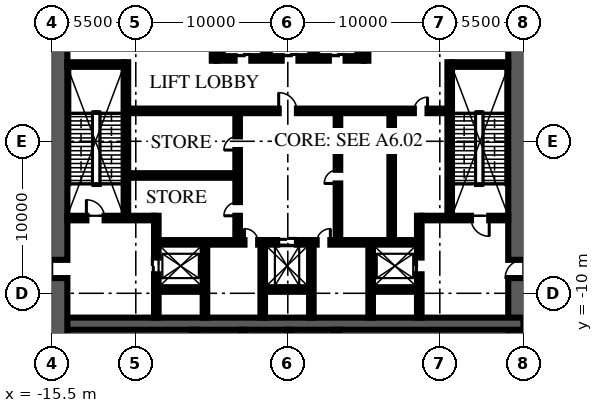
"""IFC4 building model, lengths in metres.
Left out: names, types, materials, properties, quantities, classifications, styles, units other than length and angle.
Written with IfcOpenShell. Run it as: python <this file> out.ifc"""

import sys

from ifc_helpers import new_model, si_unit, direction, frame, frame_2d, origin, place, context, subcontext, project, spatial, rectangle, extrude, element, fill, save


model = new_model("IFC4")
c1 = context("Model", 3, precision=1e-05, world=origin(), true_north=direction((0.0, 1.0)))
c2 = subcontext(c1, "Body", "Model", "MODEL_VIEW")
j1 = project(units=[si_unit("LENGTHUNIT", "METRE"), si_unit("PLANEANGLEUNIT", "RADIAN")], contexts=[c1])
p1 = place(None, origin())
s1 = spatial("IfcSite", under=j1, at=p1, CompositionType="ELEMENT")
p2 = place(p1, origin())
s2 = spatial("IfcBuilding", under=s1, at=p2, CompositionType="ELEMENT")
p3 = place(p2, origin())
s3 = spatial("IfcBuildingStorey", under=s2, at=p3, CompositionType="ELEMENT", Elevation=0.0)
p4 = place(p3, frame((15.5, -15.5, -0.3), z_axis=(0.0, 0.0, 1.0), x_axis=(0.0, 1.0, 0.0)))
e1 = element("IfcWall", 1, at=p4, inside=s3, PredefinedType="SHEAR", context=c2, shape_type="SweptSolid", body=[
    extrude(rectangle(XDim=31.0, YDim=2.0, at=frame_2d((15.5, 0.0))), origin(), (0.0, 0.0, 1.0), 6.0),
])
p5 = place(p4, frame((6.5, 0.0, 0.3)))
e2 = element("IfcOpeningElement", 2, at=p5, cuts=e1, PredefinedType="OPENING", context=c2, shape_type="SweptSolid", body=[
    extrude(rectangle(XDim=1.2, YDim=2.1, at=frame_2d((0.6, 1.05))), frame((0.0, 1.01, 0.0), z_axis=(0.0, -1.0, 0.0), x_axis=(1.0, 0.0, 0.0)), (0.0, 0.0, 1.0), 2.02),
])
p6 = place(p4, frame((23.0, 0.0, 0.3)))
e3 = element("IfcOpeningElement", 3, at=p6, cuts=e1, PredefinedType="OPENING", context=c2, shape_type="SweptSolid", body=[
    extrude(rectangle(XDim=1.8, YDim=2.1, at=frame_2d((0.9, 1.05))), frame((0.0, 1.01, 0.0), z_axis=(0.0, -1.0, 0.0), x_axis=(1.0, 0.0, 0.0)), (0.0, 0.0, 1.0), 2.02),
])
p7 = place(p3, frame((-15.5, -12.0, -0.3), z_axis=(0.0, 0.0, 1.0), x_axis=(1.0, 0.0, 0.0)))
e4 = element("IfcWall", 4, at=p7, inside=s3, PredefinedType="SHEAR", context=c2, shape_type="SweptSolid", body=[
    extrude(rectangle(XDim=31.0, YDim=0.8, at=frame_2d((15.5, 0.0))), origin(), (0.0, 0.0, 1.0), 6.0),
])
p8 = place(p3, frame((-15.5, -15.5, -0.3), z_axis=(0.0, 0.0, 1.0), x_axis=(0.0, 1.0, 0.0)))
e5 = element("IfcWall", 5, at=p8, inside=s3, PredefinedType="SHEAR", context=c2, shape_type="SweptSolid", body=[
    extrude(rectangle(XDim=31.0, YDim=2.0, at=frame_2d((15.5, 0.0))), origin(), (0.0, 0.0, 1.0), 6.0),
])
p9 = place(p8, frame((6.5, 0.0, 0.3)))
e6 = element("IfcOpeningElement", 6, at=p9, cuts=e5, PredefinedType="OPENING", context=c2, shape_type="SweptSolid", body=[
    extrude(rectangle(XDim=1.2, YDim=2.1, at=frame_2d((0.6, 1.05))), frame((0.0, 1.01, 0.0), z_axis=(0.0, -1.0, 0.0), x_axis=(1.0, 0.0, 0.0)), (0.0, 0.0, 1.0), 2.02),
])
p10 = place(p8, frame((23.0, 0.0, 0.3)))
e7 = element("IfcOpeningElement", 7, at=p10, cuts=e5, PredefinedType="OPENING", context=c2, shape_type="SweptSolid", body=[
    extrude(rectangle(XDim=1.8, YDim=2.1, at=frame_2d((0.9, 1.05))), frame((0.0, 1.01, 0.0), z_axis=(0.0, -1.0, 0.0), x_axis=(1.0, 0.0, 0.0)), (0.0, 0.0, 1.0), 2.02),
])
p11 = place(p3, frame((-10.65, -4.9, 0.0), z_axis=(0.0, 0.0, 1.0), x_axis=(0.0, 1.0, 0.0)))
e8 = element("IfcWall", 8, at=p11, inside=s3, PredefinedType="SOLIDWALL", context=c2, shape_type="SweptSolid", body=[
    extrude(rectangle(XDim=10.1, YDim=0.3, at=frame_2d((5.05, 0.0))), origin(), (0.0, 0.0, 1.0), 5.7),
])
p12 = place(p3, frame((-14.5, -5.05, 0.0), z_axis=(0.0, 0.0, 1.0), x_axis=(1.0, 0.0, 0.0)))
e9 = element("IfcWall", 9, at=p12, inside=s3, PredefinedType="SOLIDWALL", context=c2, shape_type="SweptSolid", body=[
    extrude(rectangle(XDim=5.7, YDim=0.3, at=frame_2d((2.85, 0.0))), origin(), (0.0, 0.0, 1.0), 5.7),
])
p13 = place(p12, frame((1.25, 0.0, 0.0)))
e10 = element("IfcOpeningElement", 10, at=p13, cuts=e9, PredefinedType="OPENING", context=c2, shape_type="SweptSolid", body=[
    extrude(rectangle(XDim=1.2, YDim=2.1, at=frame_2d((0.6, 1.05))), frame((0.0, 0.16, 0.0), z_axis=(0.0, -1.0, 0.0), x_axis=(1.0, 0.0, 0.0)), (0.0, 0.0, 1.0), 0.32),
])
p14 = place(p3, frame((-14.5, 5.05, 0.0), z_axis=(0.0, 0.0, 1.0), x_axis=(1.0, 0.0, 0.0)))
e11 = element("IfcWall", 11, at=p14, inside=s3, PredefinedType="SOLIDWALL", context=c2, shape_type="SweptSolid", body=[
    extrude(rectangle(XDim=3.7, YDim=0.3, at=frame_2d((1.85, 0.0))), origin(), (0.0, 0.0, 1.0), 5.7),
])
p15 = place(p3, frame((-8.65, -11.6, 0.0), z_axis=(0.0, 0.0, 1.0), x_axis=(0.0, 1.0, 0.0)))
e12 = element("IfcWall", 12, at=p15, inside=s3, PredefinedType="PARTITIONING", context=c2, shape_type="SweptSolid", body=[
    extrude(rectangle(XDim=6.7, YDim=0.3, at=frame_2d((3.35, 0.0))), origin(), (0.0, 0.0, 1.0), 5.7),
])
p16 = place(p15, frame((2.85, 0.0, 0.0)))
e13 = element("IfcOpeningElement", 13, at=p16, cuts=e12, PredefinedType="OPENING", context=c2, shape_type="SweptSolid", body=[
    extrude(rectangle(XDim=1.1, YDim=2.1, at=frame_2d((0.55, 1.05))), frame((0.0, 0.16, 0.0), z_axis=(0.0, -1.0, 0.0), x_axis=(1.0, 0.0, 0.0)), (0.0, 0.0, 1.0), 0.32),
])
p17 = place(p3, frame((10.65, -4.9, 0.0), z_axis=(0.0, 0.0, 1.0), x_axis=(0.0, 1.0, 0.0)))
e14 = element("IfcWall", 14, at=p17, inside=s3, PredefinedType="SOLIDWALL", context=c2, shape_type="SweptSolid", body=[
    extrude(rectangle(XDim=10.1, YDim=0.3, at=frame_2d((5.05, 0.0))), origin(), (0.0, 0.0, 1.0), 5.7),
])
p18 = place(p3, frame((14.5, -5.05, 0.0), z_axis=(0.0, 0.0, 1.0), x_axis=(-1.0, 0.0, 0.0)))
e15 = element("IfcWall", 15, at=p18, inside=s3, PredefinedType="SOLIDWALL", context=c2, shape_type="SweptSolid", body=[
    extrude(rectangle(XDim=5.7, YDim=0.3, at=frame_2d((2.85, 0.0))), origin(), (0.0, 0.0, 1.0), 5.7),
])
p19 = place(p18, frame((1.25, 0.0, 0.0)))
e16 = element("IfcOpeningElement", 16, at=p19, cuts=e15, PredefinedType="OPENING", context=c2, shape_type="SweptSolid", body=[
    extrude(rectangle(XDim=1.2, YDim=2.1, at=frame_2d((0.6, 1.05))), frame((0.0, 0.16, 0.0), z_axis=(0.0, -1.0, 0.0), x_axis=(1.0, 0.0, 0.0)), (0.0, 0.0, 1.0), 0.32),
])
p20 = place(p3, frame((14.5, 5.05, 0.0), z_axis=(0.0, 0.0, 1.0), x_axis=(-1.0, 0.0, 0.0)))
e17 = element("IfcWall", 17, at=p20, inside=s3, PredefinedType="SOLIDWALL", context=c2, shape_type="SweptSolid", body=[
    extrude(rectangle(XDim=3.7, YDim=0.3, at=frame_2d((1.85, 0.0))), origin(), (0.0, 0.0, 1.0), 5.7),
])
p21 = place(p3, frame((8.65, -11.6, 0.0), z_axis=(0.0, 0.0, 1.0), x_axis=(0.0, 1.0, 0.0)))
e18 = element("IfcWall", 18, at=p21, inside=s3, PredefinedType="PARTITIONING", context=c2, shape_type="SweptSolid", body=[
    extrude(rectangle(XDim=6.7, YDim=0.3, at=frame_2d((3.35, 0.0))), origin(), (0.0, 0.0, 1.0), 5.7),
])
p22 = place(p21, frame((2.85, 0.0, 0.0)))
e19 = element("IfcOpeningElement", 19, at=p22, cuts=e18, PredefinedType="OPENING", context=c2, shape_type="SweptSolid", body=[
    extrude(rectangle(XDim=1.1, YDim=2.1, at=frame_2d((0.55, 1.05))), frame((0.0, 0.16, 0.0), z_axis=(0.0, -1.0, 0.0), x_axis=(1.0, 0.0, 0.0)), (0.0, 0.0, 1.0), 0.32),
])
p23 = place(p3, frame((-8.5, -6.65, 0.0), z_axis=(0.0, 0.0, 1.0), x_axis=(1.0, 0.0, 0.0)))
e20 = element("IfcWall", 20, at=p23, inside=s3, PredefinedType="PARTITIONING", context=c2, shape_type="SweptSolid", body=[
    extrude(rectangle(XDim=17.0, YDim=0.3, at=frame_2d((8.5, 0.0))), origin(), (0.0, 0.0, 1.0), 5.7),
])
p24 = place(p23, frame((7.8, 0.0, 0.0)))
e21 = element("IfcOpeningElement", 21, at=p24, cuts=e20, PredefinedType="OPENING", context=c2, shape_type="SweptSolid", body=[
    extrude(rectangle(XDim=1.3, YDim=2.4, at=frame_2d((0.65, 1.2))), frame((0.0, 0.16, 0.0), z_axis=(0.0, -1.0, 0.0), x_axis=(1.0, 0.0, 0.0)), (0.0, 0.0, 1.0), 0.32),
])
p25 = place(p23, frame((5.65, 0.0, 0.0)))
e22 = element("IfcOpeningElement", 22, at=p25, cuts=e20, PredefinedType="OPENING", context=c2, shape_type="SweptSolid", body=[
    extrude(rectangle(XDim=0.9, YDim=2.1, at=frame_2d((0.45, 1.05))), frame((0.0, 0.16, 0.0), z_axis=(0.0, -1.0, 0.0), x_axis=(1.0, 0.0, 0.0)), (0.0, 0.0, 1.0), 0.32),
])
p26 = place(p23, frame((10.4, 0.0, 0.0)))
e23 = element("IfcOpeningElement", 23, at=p26, cuts=e20, PredefinedType="OPENING", context=c2, shape_type="SweptSolid", body=[
    extrude(rectangle(XDim=0.9, YDim=2.1, at=frame_2d((0.45, 1.05))), frame((0.0, 0.16, 0.0), z_axis=(0.0, -1.0, 0.0), x_axis=(1.0, 0.0, 0.0)), (0.0, 0.0, 1.0), 0.32),
])
for number, where, z_axis, x_axis in (
    (24, (-5.45, -11.6, 0.0), (0.0, 0.0, 1.0), (0.0, 1.0, 0.0)),
    (25, (-1.65, -11.6, 0.0), (0.0, 0.0, 1.0), (0.0, 1.0, 0.0)),
    (26, (1.55, -11.6, 0.0), (0.0, 0.0, 1.0), (0.0, 1.0, 0.0)),
    (27, (5.45, -11.6, 0.0), (0.0, 0.0, 1.0), (0.0, 1.0, 0.0)),
):
    element("IfcWall", number, at=place(p3, frame(where, z_axis=z_axis, x_axis=x_axis)), inside=s3, PredefinedType="PARTITIONING", context=c2, shape_type="SweptSolid", body=[
        extrude(rectangle(XDim=4.8, YDim=0.3, at=frame_2d((2.4, 0.0))), origin(), (0.0, 0.0, 1.0), 5.7),
    ])
for number, where, z_axis, x_axis in (
    (28, (-8.5, -9.75, 0.0), (0.0, 0.0, 1.0), (1.0, 0.0, 0.0)),
    (29, (-1.5, -9.75, 0.0), (0.0, 0.0, 1.0), (1.0, 0.0, 0.0)),
    (30, (5.6, -9.75, 0.0), (0.0, 0.0, 1.0), (1.0, 0.0, 0.0)),
):
    element("IfcWall", number, at=place(p3, frame(where, z_axis=z_axis, x_axis=x_axis)), inside=s3, PredefinedType="PARTITIONING", context=c2, shape_type="SweptSolid", body=[
        extrude(rectangle(XDim=2.9, YDim=0.3, at=frame_2d((1.45, 0.0))), origin(), (0.0, 0.0, 1.0), 5.7),
    ])
p27 = place(p3, frame((-4.7, 5.45, 0.0), z_axis=(0.0, 0.0, 1.0), x_axis=(1.0, 0.0, 0.0)))
e31 = element("IfcWall", 31, at=p27, inside=s3, PredefinedType="PARTITIONING", context=c2, shape_type="SweptSolid", body=[
    extrude(rectangle(XDim=9.7, YDim=0.3, at=frame_2d((4.85, 0.0))), origin(), (0.0, 0.0, 1.0), 5.7),
])
p28 = place(p27, frame((1.2, 0.0, 0.0)))
e32 = element("IfcOpeningElement", 32, at=p28, cuts=e31, PredefinedType="OPENING", context=c2, shape_type="SweptSolid", body=[
    extrude(rectangle(XDim=1.1, YDim=2.1, at=frame_2d((0.55, 1.05))), frame((0.0, 0.16, 0.0), z_axis=(0.0, -1.0, 0.0), x_axis=(1.0, 0.0, 0.0)), (0.0, 0.0, 1.0), 0.32),
])
p29 = place(p27, frame((4.3, 0.0, 0.0)))
e33 = element("IfcOpeningElement", 33, at=p29, cuts=e31, PredefinedType="OPENING", context=c2, shape_type="SweptSolid", body=[
    extrude(rectangle(XDim=1.1, YDim=2.1, at=frame_2d((0.55, 1.05))), frame((0.0, 0.16, 0.0), z_axis=(0.0, -1.0, 0.0), x_axis=(1.0, 0.0, 0.0)), (0.0, 0.0, 1.0), 0.32),
])
p30 = place(p27, frame((7.4, 0.0, 0.0)))
e34 = element("IfcOpeningElement", 34, at=p30, cuts=e31, PredefinedType="OPENING", context=c2, shape_type="SweptSolid", body=[
    extrude(rectangle(XDim=1.1, YDim=2.1, at=frame_2d((0.55, 1.05))), frame((0.0, 0.16, 0.0), z_axis=(0.0, -1.0, 0.0), x_axis=(1.0, 0.0, 0.0)), (0.0, 0.0, 1.0), 0.32),
])
for number, where, z_axis, x_axis in (
    (35, (-4.55, 5.6, 0.0), (0.0, 0.0, 1.0), (0.0, 1.0, 0.0)),
    (36, (4.85, 5.6, 0.0), (0.0, 0.0, 1.0), (0.0, 1.0, 0.0)),
):
    element("IfcWall", number, at=place(p3, frame(where, z_axis=z_axis, x_axis=x_axis)), inside=s3, PredefinedType="PARTITIONING", context=c2, shape_type="SweptSolid", body=[
        extrude(rectangle(XDim=2.8, YDim=0.3, at=frame_2d((1.4, 0.0))), origin(), (0.0, 0.0, 1.0), 5.7),
    ])
for number, where, z_axis, x_axis in (
    (37, (-1.4, 5.6, 0.0), (0.0, 0.0, 1.0), (0.0, 1.0, 0.0)),
    (38, (1.7, 5.6, 0.0), (0.0, 0.0, 1.0), (0.0, 1.0, 0.0)),
):
    element("IfcWall", number, at=place(p3, frame(where, z_axis=z_axis, x_axis=x_axis)), inside=s3, PredefinedType="PARTITIONING", context=c2, shape_type="SweptSolid", body=[
        extrude(rectangle(XDim=2.8, YDim=0.2, at=frame_2d((1.4, 0.0))), origin(), (0.0, 0.0, 1.0), 5.7),
    ])
for number, where, z_axis, x_axis in (
    (39, (-6.15, -14.5, 0.0), (0.0, 0.0, 1.0), (0.0, 1.0, 0.0)),
    (40, (3.25, -14.5, 0.0), (0.0, 0.0, 1.0), (0.0, 1.0, 0.0)),
):
    element("IfcWall", number, at=place(p3, frame(where, z_axis=z_axis, x_axis=x_axis)), inside=s3, PredefinedType="PARTITIONING", context=c2, shape_type="SweptSolid", body=[
        extrude(rectangle(XDim=2.1, YDim=0.3, at=frame_2d((1.05, 0.0))), origin(), (0.0, 0.0, 1.0), 5.7),
    ])
for number, where, z_axis, x_axis in (
    (41, (-3.0, -14.5, 0.0), (0.0, 0.0, 1.0), (0.0, 1.0, 0.0)),
    (42, (0.1, -14.5, 0.0), (0.0, 0.0, 1.0), (0.0, 1.0, 0.0)),
):
    element("IfcWall", number, at=place(p3, frame(where, z_axis=z_axis, x_axis=x_axis)), inside=s3, PredefinedType="PARTITIONING", context=c2, shape_type="SweptSolid", body=[
        extrude(rectangle(XDim=2.1, YDim=0.2, at=frame_2d((1.05, 0.0))), origin(), (0.0, 0.0, 1.0), 5.7),
    ])
p31 = place(p3, frame((-10.65, 2.0, 0.0), z_axis=(0.0, 0.0, 1.0), x_axis=(1.0, 0.0, 0.0)))
e43 = element("IfcWall", 43, at=p31, inside=s3, PredefinedType="PARTITIONING", context=c2, shape_type="SweptSolid", body=[
    extrude(rectangle(XDim=21.3, YDim=0.3, at=frame_2d((10.65, 0.0))), origin(), (0.0, 0.0, 1.0), 5.7),
])
p32 = place(p31, frame((10.05, 0.0, 0.0)))
e44 = element("IfcOpeningElement", 44, at=p32, cuts=e43, PredefinedType="OPENING", context=c2, shape_type="SweptSolid", body=[
    extrude(rectangle(XDim=1.2, YDim=2.1, at=frame_2d((0.6, 1.05))), frame((0.0, 0.16, 0.0), z_axis=(0.0, -1.0, 0.0), x_axis=(1.0, 0.0, 0.0)), (0.0, 0.0, 1.0), 0.32),
])
p33 = place(p31, frame((18.942, 0.0, 0.0)))
e45 = element("IfcOpeningElement", 45, at=p33, cuts=e43, PredefinedType="OPENING", context=c2, shape_type="SweptSolid", body=[
    extrude(rectangle(XDim=0.9, YDim=2.1, at=frame_2d((0.45, 1.05))), frame((0.0, 0.16, 0.0), z_axis=(0.0, -1.0, 0.0), x_axis=(1.0, 0.0, 0.0)), (0.0, 0.0, 1.0), 0.32),
])
p34 = place(p3, frame((-3.3, -6.65, 0.0), z_axis=(0.0, 0.0, 1.0), x_axis=(0.0, 1.0, 0.0)))
e46 = element("IfcWall", 46, at=p34, inside=s3, PredefinedType="PARTITIONING", context=c2, shape_type="SweptSolid", body=[
    extrude(rectangle(XDim=8.65, YDim=0.3, at=frame_2d((4.325, 0.0))), origin(), (0.0, 0.0, 1.0), 5.7),
])
p35 = place(p34, frame((1.75, 0.0, 0.0)))
e47 = element("IfcOpeningElement", 47, at=p35, cuts=e46, PredefinedType="OPENING", context=c2, shape_type="SweptSolid", body=[
    extrude(rectangle(XDim=0.9, YDim=2.1, at=frame_2d((0.45, 1.05))), frame((0.0, 0.16, 0.0), z_axis=(0.0, -1.0, 0.0), x_axis=(1.0, 0.0, 0.0)), (0.0, 0.0, 1.0), 0.32),
])
p36 = place(p34, frame((6.075, 0.0, 0.0)))
e48 = element("IfcOpeningElement", 48, at=p36, cuts=e46, PredefinedType="OPENING", context=c2, shape_type="SweptSolid", body=[
    extrude(rectangle(XDim=0.9, YDim=2.1, at=frame_2d((0.45, 1.05))), frame((0.0, 0.16, 0.0), z_axis=(0.0, -1.0, 0.0), x_axis=(1.0, 0.0, 0.0)), (0.0, 0.0, 1.0), 0.32),
])
p37 = place(p3, frame((3.3, -6.65, 0.0), z_axis=(0.0, 0.0, 1.0), x_axis=(0.0, 1.0, 0.0)))
e49 = element("IfcWall", 49, at=p37, inside=s3, PredefinedType="PARTITIONING", context=c2, shape_type="SweptSolid", body=[
    extrude(rectangle(XDim=8.65, YDim=0.3, at=frame_2d((4.325, 0.0))), origin(), (0.0, 0.0, 1.0), 5.7),
])
p38 = place(p37, frame((3.875, 0.0, 0.0)))
e50 = element("IfcOpeningElement", 50, at=p38, cuts=e49, PredefinedType="OPENING", context=c2, shape_type="SweptSolid", body=[
    extrude(rectangle(XDim=0.9, YDim=2.1, at=frame_2d((0.45, 1.05))), frame((0.0, 0.16, 0.0), z_axis=(0.0, -1.0, 0.0), x_axis=(1.0, 0.0, 0.0)), (0.0, 0.0, 1.0), 0.32),
])
p39 = place(p3, frame((-10.65, -2.25, 0.0), z_axis=(0.0, 0.0, 1.0), x_axis=(1.0, 0.0, 0.0)))
e51 = element("IfcWall", 51, at=p39, inside=s3, PredefinedType="PARTITIONING", context=c2, shape_type="SweptSolid", body=[
    extrude(rectangle(XDim=7.35, YDim=0.3, at=frame_2d((3.675, 0.0))), origin(), (0.0, 0.0, 1.0), 5.7),
])
p40 = place(p3, frame((6.834, -6.65, 0.0), z_axis=(0.0, 0.0, 1.0), x_axis=(0.0, 1.0, 0.0)))
e52 = element("IfcWall", 52, at=p40, inside=s3, PredefinedType="PARTITIONING", context=c2, shape_type="SweptSolid", body=[
    extrude(rectangle(XDim=8.65, YDim=0.3, at=frame_2d((4.325, 0.0))), origin(), (0.0, 0.0, 1.0), 5.7),
])
p41 = place(p3, frame((-4.85, 5.3, 0.0), z_axis=(0.0, 0.0, 1.0), x_axis=(0.0, 1.0, 0.0)))
e53 = element("IfcWall", 53, at=p41, inside=s3, PredefinedType="PARTITIONING", context=c2, shape_type="SweptSolid", body=[
    extrude(rectangle(XDim=6.3, YDim=0.3, at=frame_2d((3.15, 0.0))), origin(), (0.0, 0.0, 1.0), 5.7),
])
p42 = place(p41, frame((4.35, 0.0, 0.0)))
e54 = element("IfcOpeningElement", 54, at=p42, cuts=e53, PredefinedType="OPENING", context=c2, shape_type="SweptSolid", body=[
    extrude(rectangle(XDim=0.9, YDim=2.1, at=frame_2d((0.45, 1.05))), frame((0.0, 0.16, 0.0), z_axis=(0.0, -1.0, 0.0), x_axis=(1.0, 0.0, 0.0)), (0.0, 0.0, 1.0), 0.32),
])
p43 = place(p3, frame((5.15, 5.3, 0.0), z_axis=(0.0, 0.0, 1.0), x_axis=(0.0, 1.0, 0.0)))
e55 = element("IfcWall", 55, at=p43, inside=s3, PredefinedType="PARTITIONING", context=c2, shape_type="SweptSolid", body=[
    extrude(rectangle(XDim=6.3, YDim=0.3, at=frame_2d((3.15, 0.0))), origin(), (0.0, 0.0, 1.0), 5.7),
])
p44 = place(p13, origin())
e56 = element("IfcDoor", 56, at=p44, inside=s3, OperationType="SINGLE_SWING_LEFT", PredefinedType="DOOR", context=c2, shape_type="SweptSolid", body=[
    extrude(rectangle(XDim=1.2, YDim=2.1, at=frame_2d((0.6, 1.05))), frame((0.0, 0.025, 0.0), z_axis=(0.0, -1.0, 0.0), x_axis=(1.0, 0.0, 0.0)), (0.0, 0.0, 1.0), 0.05),
])
fill(e10, e56)
p45 = place(p9, origin())
e57 = element("IfcDoor", 57, at=p45, inside=s3, OperationType="SINGLE_SWING_LEFT", PredefinedType="DOOR", context=c2, shape_type="SweptSolid", body=[
    extrude(rectangle(XDim=1.2, YDim=2.1, at=frame_2d((0.6, 1.05))), frame((0.0, 0.025, 0.0), z_axis=(0.0, -1.0, 0.0), x_axis=(1.0, 0.0, 0.0)), (0.0, 0.0, 1.0), 0.05),
])
fill(e6, e57)
p46 = place(p19, origin())
e58 = element("IfcDoor", 58, at=p46, inside=s3, OperationType="SINGLE_SWING_LEFT", PredefinedType="DOOR", context=c2, shape_type="SweptSolid", body=[
    extrude(rectangle(XDim=1.2, YDim=2.1, at=frame_2d((0.6, 1.05))), frame((0.0, 0.025, 0.0), z_axis=(0.0, -1.0, 0.0), x_axis=(1.0, 0.0, 0.0)), (0.0, 0.0, 1.0), 0.05),
])
fill(e16, e58)
p47 = place(p5, origin())
e59 = element("IfcDoor", 59, at=p47, inside=s3, OperationType="SINGLE_SWING_LEFT", PredefinedType="DOOR", context=c2, shape_type="SweptSolid", body=[
    extrude(rectangle(XDim=1.2, YDim=2.1, at=frame_2d((0.6, 1.05))), frame((0.0, 0.025, 0.0), z_axis=(0.0, -1.0, 0.0), x_axis=(1.0, 0.0, 0.0)), (0.0, 0.0, 1.0), 0.05),
])
fill(e2, e59)
p48 = place(p16, origin())
e60 = element("IfcDoor", 60, at=p48, inside=s3, OperationType="DOUBLE_DOOR_SLIDING", PredefinedType="DOOR", context=c2, shape_type="SweptSolid", body=[
    extrude(rectangle(XDim=1.1, YDim=2.1, at=frame_2d((0.55, 1.05))), frame((0.0, 0.025, 0.0), z_axis=(0.0, -1.0, 0.0), x_axis=(1.0, 0.0, 0.0)), (0.0, 0.0, 1.0), 0.05),
])
fill(e13, e60)
p49 = place(p22, origin())
e61 = element("IfcDoor", 61, at=p49, inside=s3, OperationType="DOUBLE_DOOR_SLIDING", PredefinedType="DOOR", context=c2, shape_type="SweptSolid", body=[
    extrude(rectangle(XDim=1.1, YDim=2.1, at=frame_2d((0.55, 1.05))), frame((0.0, 0.025, 0.0), z_axis=(0.0, -1.0, 0.0), x_axis=(1.0, 0.0, 0.0)), (0.0, 0.0, 1.0), 0.05),
])
fill(e19, e61)
p50 = place(p28, origin())
e62 = element("IfcDoor", 62, at=p50, inside=s3, OperationType="DOUBLE_DOOR_SLIDING", PredefinedType="DOOR", context=c2, shape_type="SweptSolid", body=[
    extrude(rectangle(XDim=1.1, YDim=2.1, at=frame_2d((0.55, 1.05))), frame((0.0, 0.025, 0.0), z_axis=(0.0, -1.0, 0.0), x_axis=(1.0, 0.0, 0.0)), (0.0, 0.0, 1.0), 0.05),
])
fill(e32, e62)
p51 = place(p29, origin())
e63 = element("IfcDoor", 63, at=p51, inside=s3, OperationType="DOUBLE_DOOR_SLIDING", PredefinedType="DOOR", context=c2, shape_type="SweptSolid", body=[
    extrude(rectangle(XDim=1.1, YDim=2.1, at=frame_2d((0.55, 1.05))), frame((0.0, 0.025, 0.0), z_axis=(0.0, -1.0, 0.0), x_axis=(1.0, 0.0, 0.0)), (0.0, 0.0, 1.0), 0.05),
])
fill(e33, e63)
p52 = place(p30, origin())
e64 = element("IfcDoor", 64, at=p52, inside=s3, OperationType="DOUBLE_DOOR_SLIDING", PredefinedType="DOOR", context=c2, shape_type="SweptSolid", body=[
    extrude(rectangle(XDim=1.1, YDim=2.1, at=frame_2d((0.55, 1.05))), frame((0.0, 0.025, 0.0), z_axis=(0.0, -1.0, 0.0), x_axis=(1.0, 0.0, 0.0)), (0.0, 0.0, 1.0), 0.05),
])
fill(e34, e64)
p53 = place(p24, origin())
e65 = element("IfcDoor", 65, at=p53, inside=s3, OperationType="DOUBLE_DOOR_SLIDING", PredefinedType="DOOR", context=c2, shape_type="SweptSolid", body=[
    extrude(rectangle(XDim=1.3, YDim=2.4, at=frame_2d((0.65, 1.2))), frame((0.0, 0.025, 0.0), z_axis=(0.0, -1.0, 0.0), x_axis=(1.0, 0.0, 0.0)), (0.0, 0.0, 1.0), 0.05),
])
fill(e21, e65)
p54 = place(p32, origin())
e66 = element("IfcDoor", 66, at=p54, inside=s3, OperationType="SINGLE_SWING_LEFT", PredefinedType="DOOR", context=c2, shape_type="SweptSolid", body=[
    extrude(rectangle(XDim=1.2, YDim=2.1, at=frame_2d((0.6, 1.05))), frame((0.0, 0.025, 0.0), z_axis=(0.0, -1.0, 0.0), x_axis=(1.0, 0.0, 0.0)), (0.0, 0.0, 1.0), 0.05),
])
fill(e44, e66)
p55 = place(p25, origin())
e67 = element("IfcDoor", 67, at=p55, inside=s3, OperationType="SINGLE_SWING_LEFT", PredefinedType="DOOR", context=c2, shape_type="SweptSolid", body=[
    extrude(rectangle(XDim=0.9, YDim=2.1, at=frame_2d((0.45, 1.05))), frame((0.0, 0.025, 0.0), z_axis=(0.0, -1.0, 0.0), x_axis=(1.0, 0.0, 0.0)), (0.0, 0.0, 1.0), 0.05),
])
fill(e22, e67)
p56 = place(p26, origin())
e68 = element("IfcDoor", 68, at=p56, inside=s3, OperationType="SINGLE_SWING_RIGHT", PredefinedType="DOOR", context=c2, shape_type="SweptSolid", body=[
    extrude(rectangle(XDim=0.9, YDim=2.1, at=frame_2d((0.45, 1.05))), frame((0.0, 0.025, 0.0), z_axis=(0.0, -1.0, 0.0), x_axis=(1.0, 0.0, 0.0)), (0.0, 0.0, 1.0), 0.05),
])
fill(e23, e68)
p57 = place(p35, origin())
e69 = element("IfcDoor", 69, at=p57, inside=s3, OperationType="SINGLE_SWING_LEFT", PredefinedType="DOOR", context=c2, shape_type="SweptSolid", body=[
    extrude(rectangle(XDim=0.9, YDim=2.1, at=frame_2d((0.45, 1.05))), frame((0.0, 0.025, 0.0), z_axis=(0.0, -1.0, 0.0), x_axis=(1.0, 0.0, 0.0)), (0.0, 0.0, 1.0), 0.05),
])
fill(e47, e69)
p58 = place(p36, origin())
e70 = element("IfcDoor", 70, at=p58, inside=s3, OperationType="SINGLE_SWING_LEFT", PredefinedType="DOOR", context=c2, shape_type="SweptSolid", body=[
    extrude(rectangle(XDim=0.9, YDim=2.1, at=frame_2d((0.45, 1.05))), frame((0.0, 0.025, 0.0), z_axis=(0.0, -1.0, 0.0), x_axis=(1.0, 0.0, 0.0)), (0.0, 0.0, 1.0), 0.05),
])
fill(e48, e70)
p59 = place(p38, origin())
e71 = element("IfcDoor", 71, at=p59, inside=s3, OperationType="SINGLE_SWING_LEFT", PredefinedType="DOOR", context=c2, shape_type="SweptSolid", body=[
    extrude(rectangle(XDim=0.9, YDim=2.1, at=frame_2d((0.45, 1.05))), frame((0.0, 0.025, 0.0), z_axis=(0.0, -1.0, 0.0), x_axis=(1.0, 0.0, 0.0)), (0.0, 0.0, 1.0), 0.05),
])
fill(e50, e71)
p60 = place(p33, origin())
e72 = element("IfcDoor", 72, at=p60, inside=s3, OperationType="SINGLE_SWING_RIGHT", PredefinedType="DOOR", context=c2, shape_type="SweptSolid", body=[
    extrude(rectangle(XDim=0.9, YDim=2.1, at=frame_2d((0.45, 1.05))), frame((0.0, 0.025, 0.0), z_axis=(0.0, -1.0, 0.0), x_axis=(1.0, 0.0, 0.0)), (0.0, 0.0, 1.0), 0.05),
])
fill(e45, e72)
save(model, sys.argv[1])
